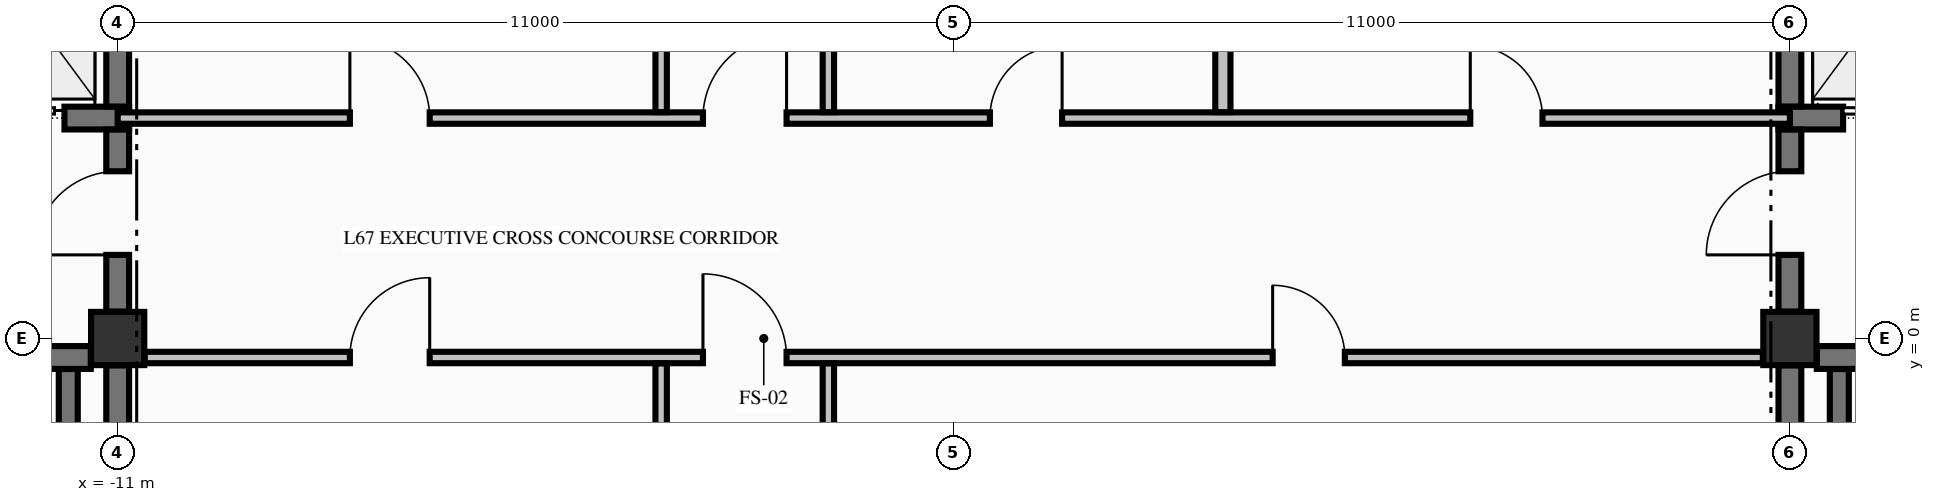
"""IFC4 building model, lengths in metres.
Left out: names, types, materials, properties, quantities, classifications, styles, units other than length and angle.
Written with IfcOpenShell. Run it as: python <this file> out.ifc"""

import sys

from ifc_helpers import new_model, si_unit, direction, frame, frame_2d, origin, origin_2d, place, context, subcontext, project, spatial, rectangle, extrude, element, fill, save


model = new_model("IFC4")
c1 = context("Model", 3, precision=1e-05, world=origin(), true_north=direction((0.0, 1.0)))
c2 = subcontext(c1, "Body", "Model", "MODEL_VIEW")
j1 = project(units=[si_unit("LENGTHUNIT", "METRE"), si_unit("PLANEANGLEUNIT", "RADIAN")], contexts=[c1])
p1 = place(None, origin())
s1 = spatial("IfcSite", under=j1, at=p1, CompositionType="ELEMENT")
p2 = place(p1, origin())
s2 = spatial("IfcBuilding", under=s1, at=p2, CompositionType="ELEMENT")
p3 = place(p2, frame((0.0, 0.0, 254.43)))
s3 = spatial("IfcBuildingStorey", under=s2, at=p3, CompositionType="ELEMENT", Elevation=254.43)
for number, where, z_axis, x_axis in (
    (1, (-11.0, 0.0, -0.425), (0.0, 0.0, 1.0), (1.0, 0.0, 0.0)),
    (2, (11.0, 0.0, -0.425), (0.0, 0.0, 1.0), (1.0, 0.0, 0.0)),
):
    element("IfcColumn", number, at=place(p3, frame(where, z_axis=z_axis, x_axis=x_axis)), inside=s3, PredefinedType="COLUMN", context=c2, shape_type="SweptSolid", body=[
        extrude(rectangle(XDim=0.7, YDim=0.7, at=origin_2d()), origin(), (0.0, 0.0, 1.0), 3.405),
    ])
p4 = place(p3, frame((-19.646, -0.25, 0.0), z_axis=(0.0, 0.0, 1.0), x_axis=(1.0, 0.0, 0.0)))
e3 = element("IfcWall", 3, at=p4, inside=s3, PredefinedType="SHEAR", context=c2, shape_type="SweptSolid", body=[
    extrude(rectangle(XDim=8.292, YDim=0.3, at=frame_2d((4.146, 0.0))), origin(), (0.0, 0.0, 1.0), 2.98),
])
p5 = place(p4, frame((5.946, 0.0, 0.0)))
e4 = element("IfcOpeningElement", 4, at=p5, cuts=e3, PredefinedType="OPENING", context=c2, shape_type="SweptSolid", body=[
    extrude(rectangle(XDim=1.1, YDim=2.15, at=frame_2d((0.55, 1.075))), frame((0.0, 0.16, 0.0), z_axis=(0.0, -1.0, 0.0), x_axis=(1.0, 0.0, 0.0)), (0.0, 0.0, 1.0), 0.32),
])
p6 = place(p3, frame((11.354, -0.25, 0.0), z_axis=(0.0, 0.0, 1.0), x_axis=(1.0, 0.0, 0.0)))
e5 = element("IfcWall", 5, at=p6, inside=s3, PredefinedType="SHEAR", context=c2, shape_type="SweptSolid", body=[
    extrude(rectangle(XDim=3.521, YDim=0.3, at=frame_2d((1.76, 0.0))), origin(), (0.0, 0.0, 1.0), 2.98),
])
p7 = place(p6, frame((1.246, 0.0, 0.0)))
e6 = element("IfcOpeningElement", 6, at=p7, cuts=e5, PredefinedType="OPENING", context=c2, shape_type="SweptSolid", body=[
    extrude(rectangle(XDim=1.1, YDim=2.15, at=frame_2d((0.55, 1.075))), frame((0.0, 0.16, 0.0), z_axis=(0.0, -1.0, 0.0), x_axis=(1.0, 0.0, 0.0)), (0.0, 0.0, 1.0), 0.32),
])
p8 = place(p3, frame((-14.875, 2.9, 0.0), z_axis=(0.0, 0.0, 1.0), x_axis=(1.0, 0.0, 0.0)))
e7 = element("IfcWall", 7, at=p8, inside=s3, PredefinedType="SHEAR", context=c2, shape_type="SweptSolid", body=[
    extrude(rectangle(XDim=4.025, YDim=0.3, at=frame_2d((2.012, 0.0))), origin(), (0.0, 0.0, 1.0), 2.98),
])
p9 = place(p8, frame((2.075, 0.0, 0.0)))
e8 = element("IfcOpeningElement", 8, at=p9, cuts=e7, PredefinedType="OPENING", context=c2, shape_type="SweptSolid", body=[
    extrude(rectangle(XDim=1.1, YDim=2.2, at=frame_2d((0.55, 1.1))), frame((0.0, 0.16, 0.0), z_axis=(0.0, -1.0, 0.0), x_axis=(1.0, 0.0, 0.0)), (0.0, 0.0, 1.0), 0.32),
])
p10 = place(p3, frame((10.85, 2.9, 0.0), z_axis=(0.0, 0.0, 1.0), x_axis=(1.0, 0.0, 0.0)))
e9 = element("IfcWall", 9, at=p10, inside=s3, PredefinedType="SHEAR", context=c2, shape_type="SweptSolid", body=[
    extrude(rectangle(XDim=4.025, YDim=0.3, at=frame_2d((2.012, 0.0))), origin(), (0.0, 0.0, 1.0), 2.98),
])
p11 = place(p10, frame((0.85, 0.0, 0.0)))
e10 = element("IfcOpeningElement", 10, at=p11, cuts=e9, PredefinedType="OPENING", context=c2, shape_type="SweptSolid", body=[
    extrude(rectangle(XDim=1.1, YDim=2.2, at=frame_2d((0.55, 1.1))), frame((0.0, 0.16, 0.0), z_axis=(0.0, -1.0, 0.0), x_axis=(1.0, 0.0, 0.0)), (0.0, 0.0, 1.0), 0.32),
])
p12 = place(p3, frame((-10.644, -0.25, 0.0), z_axis=(0.0, 0.0, 1.0), x_axis=(1.0, 0.0, 0.0)))
e11 = element("IfcWall", 11, at=p12, inside=s3, PredefinedType="PARTITIONING", context=c2, shape_type="SweptSolid", body=[
    extrude(rectangle(XDim=21.288, YDim=0.15, at=frame_2d((10.644, 0.0))), origin(), (0.0, 0.0, 1.0), 2.98),
])
p13 = place(p12, frame((7.344, 0.0, 0.0)))
e12 = element("IfcOpeningElement", 12, at=p13, cuts=e11, PredefinedType="OPENING", context=c2, shape_type="SweptSolid", body=[
    extrude(rectangle(XDim=1.1, YDim=2.15, at=frame_2d((0.55, 1.075))), frame((0.0, 0.085, 0.0), z_axis=(0.0, -1.0, 0.0), x_axis=(1.0, 0.0, 0.0)), (0.0, 0.0, 1.0), 0.17),
])
p14 = place(p12, frame((2.699, 0.0, 0.0)))
e13 = element("IfcOpeningElement", 13, at=p14, cuts=e11, PredefinedType="OPENING", context=c2, shape_type="SweptSolid", body=[
    extrude(rectangle(XDim=1.05, YDim=2.15, at=frame_2d((0.525, 1.075))), frame((0.0, 0.085, 0.0), z_axis=(0.0, -1.0, 0.0), x_axis=(1.0, 0.0, 0.0)), (0.0, 0.0, 1.0), 0.17),
])
p15 = place(p12, frame((14.839, 0.0, 0.0)))
e14 = element("IfcOpeningElement", 14, at=p15, cuts=e11, PredefinedType="OPENING", context=c2, shape_type="SweptSolid", body=[
    extrude(rectangle(XDim=0.95, YDim=2.15, at=frame_2d((0.475, 1.075))), frame((0.0, 0.085, 0.0), z_axis=(0.0, -1.0, 0.0), x_axis=(1.0, 0.0, 0.0)), (0.0, 0.0, 1.0), 0.17),
])
p16 = place(p3, frame((-11.0, 2.9, 0.0), z_axis=(0.0, 0.0, 1.0), x_axis=(1.0, 0.0, 0.0)))
e15 = element("IfcWall", 15, at=p16, inside=s3, PredefinedType="PARTITIONING", context=c2, shape_type="SweptSolid", body=[
    extrude(rectangle(XDim=22.0, YDim=0.15, at=frame_2d((11.0, 0.0))), origin(), (0.0, 0.0, 1.0), 2.98),
])
p17 = place(p16, frame((7.7, 0.0, 0.0)))
e16 = element("IfcOpeningElement", 16, at=p17, cuts=e15, PredefinedType="OPENING", context=c2, shape_type="SweptSolid", body=[
    extrude(rectangle(XDim=1.1, YDim=2.15, at=frame_2d((0.55, 1.075))), frame((0.0, 0.085, 0.0), z_axis=(0.0, -1.0, 0.0), x_axis=(1.0, 0.0, 0.0)), (0.0, 0.0, 1.0), 0.17),
])
p18 = place(p16, frame((3.055, 0.0, 0.0)))
e17 = element("IfcOpeningElement", 17, at=p18, cuts=e15, PredefinedType="OPENING", context=c2, shape_type="SweptSolid", body=[
    extrude(rectangle(XDim=1.05, YDim=2.15, at=frame_2d((0.525, 1.075))), frame((0.0, 0.085, 0.0), z_axis=(0.0, -1.0, 0.0), x_axis=(1.0, 0.0, 0.0)), (0.0, 0.0, 1.0), 0.17),
])
p19 = place(p16, frame((11.475, 0.0, 0.0)))
e18 = element("IfcOpeningElement", 18, at=p19, cuts=e15, PredefinedType="OPENING", context=c2, shape_type="SweptSolid", body=[
    extrude(rectangle(XDim=0.95, YDim=2.15, at=frame_2d((0.475, 1.075))), frame((0.0, 0.085, 0.0), z_axis=(0.0, -1.0, 0.0), x_axis=(1.0, 0.0, 0.0)), (0.0, 0.0, 1.0), 0.17),
])
p20 = place(p16, frame((17.795, 0.0, 0.0)))
e19 = element("IfcOpeningElement", 19, at=p20, cuts=e15, PredefinedType="OPENING", context=c2, shape_type="SweptSolid", body=[
    extrude(rectangle(XDim=0.95, YDim=2.15, at=frame_2d((0.475, 1.075))), frame((0.0, 0.085, 0.0), z_axis=(0.0, -1.0, 0.0), x_axis=(1.0, 0.0, 0.0)), (0.0, 0.0, 1.0), 0.17),
])
p21 = place(p3, frame((-11.65, -9.798, 0.0), z_axis=(0.0, 0.0, 1.0), x_axis=(0.0, 1.0, 0.0)))
e20 = element("IfcWall", 20, at=p21, inside=s3, PredefinedType="SOLIDWALL", context=c2, shape_type="SweptSolid", body=[
    extrude(rectangle(XDim=9.396, YDim=0.25, at=frame_2d((4.698, 0.0))), origin(), (0.0, 0.0, 1.0), 2.98),
])
p22 = place(p3, frame((-11.0, -9.596, 0.0), z_axis=(0.0, 0.0, 1.0), x_axis=(0.0, 1.0, 0.0)))
e21 = element("IfcWall", 21, at=p22, inside=s3, PredefinedType="SHEAR", context=c2, shape_type="SweptSolid", body=[
    extrude(rectangle(XDim=9.242, YDim=0.3, at=frame_2d((4.621, 0.0))), origin(), (0.0, 0.0, 1.0), 2.98),
])
p23 = place(p3, frame((-11.0, 0.354, 0.0), z_axis=(0.0, 0.0, 1.0), x_axis=(0.0, 1.0, 0.0)))
e22 = element("IfcWall", 22, at=p23, inside=s3, PredefinedType="SHEAR", context=c2, shape_type="SweptSolid", body=[
    extrude(rectangle(XDim=2.394, YDim=0.3, at=frame_2d((1.197, 0.0))), origin(), (0.0, 0.0, 1.0), 2.98),
])
p24 = place(p23, frame((0.746, 0.0, 0.0)))
e23 = element("IfcOpeningElement", 23, at=p24, cuts=e22, PredefinedType="OPENING", context=c2, shape_type="SweptSolid", body=[
    extrude(rectangle(XDim=1.1, YDim=2.15, at=frame_2d((0.55, 1.075))), frame((0.0, 0.16, 0.0), z_axis=(0.0, -1.0, 0.0), x_axis=(1.0, 0.0, 0.0)), (0.0, 0.0, 1.0), 0.32),
])
p25 = place(p3, frame((-11.0, 3.052, 0.0), z_axis=(0.0, 0.0, 1.0), x_axis=(0.0, 1.0, 0.0)))
e24 = element("IfcWall", 24, at=p25, inside=s3, PredefinedType="SHEAR", context=c2, shape_type="SweptSolid", body=[
    extrude(rectangle(XDim=2.496, YDim=0.3, at=frame_2d((1.248, 0.0))), origin(), (0.0, 0.0, 1.0), 2.98),
])
p26 = place(p3, frame((11.0, -9.596, 0.0), z_axis=(0.0, 0.0, 1.0), x_axis=(0.0, 1.0, 0.0)))
e25 = element("IfcWall", 25, at=p26, inside=s3, PredefinedType="SHEAR", context=c2, shape_type="SweptSolid", body=[
    extrude(rectangle(XDim=9.242, YDim=0.3, at=frame_2d((4.621, 0.0))), origin(), (0.0, 0.0, 1.0), 2.98),
])
p27 = place(p3, frame((11.0, 0.354, 0.0), z_axis=(0.0, 0.0, 1.0), x_axis=(0.0, 1.0, 0.0)))
e26 = element("IfcWall", 26, at=p27, inside=s3, PredefinedType="SHEAR", context=c2, shape_type="SweptSolid", body=[
    extrude(rectangle(XDim=2.394, YDim=0.3, at=frame_2d((1.197, 0.0))), origin(), (0.0, 0.0, 1.0), 2.98),
])
p28 = place(p27, frame((0.746, 0.0, 0.0)))
e27 = element("IfcOpeningElement", 27, at=p28, cuts=e26, PredefinedType="OPENING", context=c2, shape_type="SweptSolid", body=[
    extrude(rectangle(XDim=1.1, YDim=2.15, at=frame_2d((0.55, 1.075))), frame((0.0, 0.16, 0.0), z_axis=(0.0, -1.0, 0.0), x_axis=(1.0, 0.0, 0.0)), (0.0, 0.0, 1.0), 0.32),
])
p29 = place(p3, frame((11.0, 3.052, 0.0), z_axis=(0.0, 0.0, 1.0), x_axis=(0.0, 1.0, 0.0)))
e28 = element("IfcWall", 28, at=p29, inside=s3, PredefinedType="SHEAR", context=c2, shape_type="SweptSolid", body=[
    extrude(rectangle(XDim=2.496, YDim=0.3, at=frame_2d((1.248, 0.0))), origin(), (0.0, 0.0, 1.0), 2.98),
])
p30 = place(p3, frame((11.65, -9.798, 0.0), z_axis=(0.0, 0.0, 1.0), x_axis=(0.0, 1.0, 0.0)))
e29 = element("IfcWall", 29, at=p30, inside=s3, PredefinedType="SOLIDWALL", context=c2, shape_type="SweptSolid", body=[
    extrude(rectangle(XDim=9.396, YDim=0.25, at=frame_2d((4.698, 0.0))), origin(), (0.0, 0.0, 1.0), 2.98),
])
p31 = place(p3, frame((-3.85, -9.872, 0.0), z_axis=(0.0, 0.0, 1.0), x_axis=(0.0, 1.0, 0.0)))
e30 = element("IfcWall", 30, at=p31, inside=s3, PredefinedType="PARTITIONING", context=c2, shape_type="SweptSolid", body=[
    extrude(rectangle(XDim=9.544, YDim=0.15, at=frame_2d((4.772, 0.0))), origin(), (0.0, 0.0, 1.0), 2.98),
])
p32 = place(p3, frame((-3.85, 2.978, 0.0), z_axis=(0.0, 0.0, 1.0), x_axis=(0.0, 1.0, 0.0)))
e31 = element("IfcWall", 31, at=p32, inside=s3, PredefinedType="PARTITIONING", context=c2, shape_type="SweptSolid", body=[
    extrude(rectangle(XDim=7.444, YDim=0.15, at=frame_2d((3.722, 0.0))), origin(), (0.0, 0.0, 1.0), 2.98),
])
p33 = place(p3, frame((-1.65, -5.247, 0.0), z_axis=(0.0, 0.0, 1.0), x_axis=(0.0, 1.0, 0.0)))
e32 = element("IfcWall", 32, at=p33, inside=s3, PredefinedType="PARTITIONING", context=c2, shape_type="SweptSolid", body=[
    extrude(rectangle(XDim=4.919, YDim=0.15, at=frame_2d((2.459, 0.0))), origin(), (0.0, 0.0, 1.0), 2.98),
])
p34 = place(p3, frame((-1.65, 2.978, 0.0), z_axis=(0.0, 0.0, 1.0), x_axis=(0.0, 1.0, 0.0)))
e33 = element("IfcWall", 33, at=p34, inside=s3, PredefinedType="PARTITIONING", context=c2, shape_type="SweptSolid", body=[
    extrude(rectangle(XDim=7.444, YDim=0.15, at=frame_2d((3.722, 0.0))), origin(), (0.0, 0.0, 1.0), 2.98),
])
p35 = place(p3, frame((3.54, 2.978, 0.0), z_axis=(0.0, 0.0, 1.0), x_axis=(0.0, 1.0, 0.0)))
e34 = element("IfcWall", 34, at=p35, inside=s3, PredefinedType="PARTITIONING", context=c2, shape_type="SweptSolid", body=[
    extrude(rectangle(XDim=7.444, YDim=0.2, at=frame_2d((3.722, 0.0))), origin(), (0.0, 0.0, 1.0), 2.98),
])
p36 = place(p24, origin())
e35 = element("IfcDoor", 35, at=p36, inside=s3, OperationType="SINGLE_SWING_LEFT", PredefinedType="DOOR", context=c2, shape_type="SweptSolid", body=[
    extrude(rectangle(XDim=1.1, YDim=2.15, at=frame_2d((0.55, 1.075))), frame((0.0, 0.025, 0.0), z_axis=(0.0, -1.0, 0.0), x_axis=(1.0, 0.0, 0.0)), (0.0, 0.0, 1.0), 0.05),
])
fill(e23, e35)
p37 = place(p9, origin())
e36 = element("IfcDoor", 36, at=p37, inside=s3, OperationType="SLIDING_TO_LEFT", PredefinedType="DOOR", context=c2, shape_type="SweptSolid", body=[
    extrude(rectangle(XDim=1.1, YDim=2.2, at=frame_2d((0.55, 1.1))), frame((0.0, 0.025, 0.0), z_axis=(0.0, -1.0, 0.0), x_axis=(1.0, 0.0, 0.0)), (0.0, 0.0, 1.0), 0.05),
])
fill(e8, e36)
p38 = place(p28, origin())
e37 = element("IfcDoor", 37, at=p38, inside=s3, OperationType="SINGLE_SWING_LEFT", PredefinedType="DOOR", context=c2, shape_type="SweptSolid", body=[
    extrude(rectangle(XDim=1.1, YDim=2.15, at=frame_2d((0.55, 1.075))), frame((0.0, 0.025, 0.0), z_axis=(0.0, -1.0, 0.0), x_axis=(1.0, 0.0, 0.0)), (0.0, 0.0, 1.0), 0.05),
])
fill(e27, e37)
p39 = place(p11, origin())
e38 = element("IfcDoor", 38, at=p39, inside=s3, OperationType="SLIDING_TO_RIGHT", PredefinedType="DOOR", context=c2, shape_type="SweptSolid", body=[
    extrude(rectangle(XDim=1.1, YDim=2.2, at=frame_2d((0.55, 1.1))), frame((0.0, 0.025, 0.0), z_axis=(0.0, -1.0, 0.0), x_axis=(1.0, 0.0, 0.0)), (0.0, 0.0, 1.0), 0.05),
])
fill(e10, e38)
p40 = place(p17, origin())
e39 = element("IfcDoor", 39, at=p40, inside=s3, OperationType="SINGLE_SWING_RIGHT", PredefinedType="DOOR", context=c2, shape_type="SweptSolid", body=[
    extrude(rectangle(XDim=1.1, YDim=2.15, at=frame_2d((0.55, 1.075))), frame((0.0, 0.025, 0.0), z_axis=(0.0, -1.0, 0.0), x_axis=(1.0, 0.0, 0.0)), (0.0, 0.0, 1.0), 0.05),
])
fill(e16, e39)
p41 = place(p13, origin())
e40 = element("IfcDoor", 40, at=p41, inside=s3, OperationType="SINGLE_SWING_LEFT", PredefinedType="DOOR", context=c2, shape_type="SweptSolid", body=[
    extrude(rectangle(XDim=1.1, YDim=2.15, at=frame_2d((0.55, 1.075))), frame((0.0, 0.025, 0.0), z_axis=(0.0, -1.0, 0.0), x_axis=(1.0, 0.0, 0.0)), (0.0, 0.0, 1.0), 0.05),
])
fill(e12, e40)
p42 = place(p18, origin())
e41 = element("IfcDoor", 41, at=p42, inside=s3, OperationType="SINGLE_SWING_LEFT", PredefinedType="DOOR", context=c2, shape_type="SweptSolid", body=[
    extrude(rectangle(XDim=1.05, YDim=2.15, at=frame_2d((0.525, 1.075))), frame((0.0, 0.025, 0.0), z_axis=(0.0, -1.0, 0.0), x_axis=(1.0, 0.0, 0.0)), (0.0, 0.0, 1.0), 0.05),
])
fill(e17, e41)
p43 = place(p19, origin())
e42 = element("IfcDoor", 42, at=p43, inside=s3, OperationType="SINGLE_SWING_RIGHT", PredefinedType="DOOR", context=c2, shape_type="SweptSolid", body=[
    extrude(rectangle(XDim=0.95, YDim=2.15, at=frame_2d((0.475, 1.075))), frame((0.0, 0.025, 0.0), z_axis=(0.0, -1.0, 0.0), x_axis=(1.0, 0.0, 0.0)), (0.0, 0.0, 1.0), 0.05),
])
fill(e18, e42)
p44 = place(p20, origin())
e43 = element("IfcDoor", 43, at=p44, inside=s3, OperationType="SINGLE_SWING_LEFT", PredefinedType="DOOR", context=c2, shape_type="SweptSolid", body=[
    extrude(rectangle(XDim=0.95, YDim=2.15, at=frame_2d((0.475, 1.075))), frame((0.0, 0.025, 0.0), z_axis=(0.0, -1.0, 0.0), x_axis=(1.0, 0.0, 0.0)), (0.0, 0.0, 1.0), 0.05),
])
fill(e19, e43)
p45 = place(p14, origin())
e44 = element("IfcDoor", 44, at=p45, inside=s3, OperationType="SINGLE_SWING_RIGHT", PredefinedType="DOOR", context=c2, shape_type="SweptSolid", body=[
    extrude(rectangle(XDim=1.05, YDim=2.15, at=frame_2d((0.525, 1.075))), frame((0.0, 0.025, 0.0), z_axis=(0.0, -1.0, 0.0), x_axis=(1.0, 0.0, 0.0)), (0.0, 0.0, 1.0), 0.05),
])
fill(e13, e44)
p46 = place(p15, origin())
e45 = element("IfcDoor", 45, at=p46, inside=s3, OperationType="SINGLE_SWING_LEFT", PredefinedType="DOOR", context=c2, shape_type="SweptSolid", body=[
    extrude(rectangle(XDim=0.95, YDim=2.15, at=frame_2d((0.475, 1.075))), frame((0.0, 0.025, 0.0), z_axis=(0.0, -1.0, 0.0), x_axis=(1.0, 0.0, 0.0)), (0.0, 0.0, 1.0), 0.05),
])
fill(e14, e45)
save(model, sys.argv[1])
